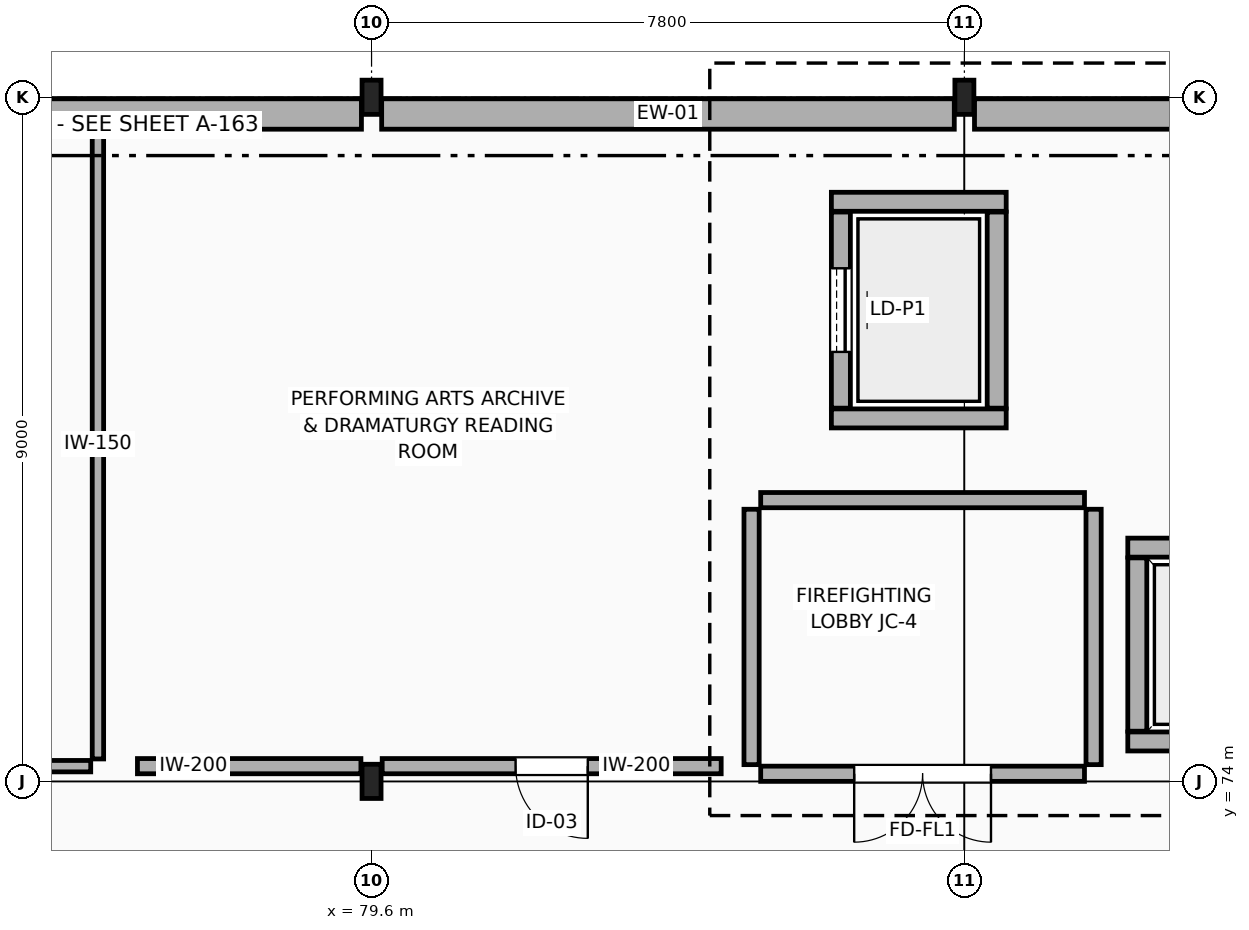
"""IFC4 building model, lengths in metres.
Left out: names, types, materials, properties, quantities, classifications, styles, units other than length and angle.
Written with IfcOpenShell. Run it as: python <this file> out.ifc"""

import sys

from ifc_helpers import new_model, si_unit, direction, frame, frame_2d, origin, origin_2d, place, context, subcontext, project, spatial, rectangle, i_section, extrude, element, fill, save


model = new_model("IFC4")
c1 = context("Model", 3, precision=1e-05, world=origin(), true_north=direction((0.0, 1.0)))
c2 = subcontext(c1, "Body", "Model", "MODEL_VIEW")
j1 = project(units=[si_unit("LENGTHUNIT", "METRE"), si_unit("PLANEANGLEUNIT", "RADIAN")], contexts=[c1])
p1 = place(None, origin())
s1 = spatial("IfcSite", under=j1, at=p1, CompositionType="ELEMENT")
p2 = place(p1, origin())
s2 = spatial("IfcBuilding", under=s1, at=p2, CompositionType="ELEMENT")
p3 = place(p2, frame((0.0, 0.0, 24.3)))
s3 = spatial("IfcBuildingStorey", under=s2, at=p3, CompositionType="ELEMENT", Elevation=24.3)
for number, where, z_axis, x_axis in (
    (1, (79.6, 74.0, 0.0), (0.0, 0.0, 1.0), (1.0, 0.0, 0.0)),
    (2, (79.6, 83.0, 0.0), (0.0, 0.0, 1.0), (1.0, 0.0, 0.0)),
    (3, (87.4, 83.0, 0.0), (0.0, 0.0, 1.0), (1.0, 0.0, 0.0)),
):
    element("IfcColumn", number, at=place(p3, frame(where, z_axis=z_axis, x_axis=x_axis)), inside=s3, PredefinedType="COLUMN", context=c2, shape_type="SweptSolid", body=[
        extrude(i_section(OverallWidth=0.25, OverallDepth=0.45, WebThickness=0.011, FlangeThickness=0.014, FilletRadius=0.015, at=origin_2d()), origin(), (0.0, 0.0, 1.0), 4.5),
    ])
p4 = place(p3, frame((71.933, 82.78, 0.0), z_axis=(0.0, 0.0, 1.0), x_axis=(1.0, 0.0, 0.0)))
e4 = element("IfcWall", 4, at=p4, inside=s3, PredefinedType="STANDARD", context=c2, shape_type="SweptSolid", body=[
    extrude(rectangle(XDim=7.534, YDim=0.4, at=frame_2d((3.767, 0.0))), origin(), (0.0, 0.0, 1.0), 4.5),
])
p5 = place(p3, frame((79.733, 82.78, 0.0), z_axis=(0.0, 0.0, 1.0), x_axis=(1.0, 0.0, 0.0)))
e5 = element("IfcWall", 5, at=p5, inside=s3, PredefinedType="STANDARD", context=c2, shape_type="SweptSolid", body=[
    extrude(rectangle(XDim=7.534, YDim=0.4, at=frame_2d((3.767, 0.0))), origin(), (0.0, 0.0, 1.0), 4.5),
])
p6 = place(p3, frame((87.533, 82.78, 0.0), z_axis=(0.0, 0.0, 1.0), x_axis=(1.0, 0.0, 0.0)))
e6 = element("IfcWall", 6, at=p6, inside=s3, PredefinedType="STANDARD", context=c2, shape_type="SweptSolid", body=[
    extrude(rectangle(XDim=5.863, YDim=0.4, at=frame_2d((2.932, 0.0))), origin(), (0.0, 0.0, 1.0), 4.28),
])
p7 = place(p3, frame((89.55, 74.525, 0.0), z_axis=(0.0, 0.0, 1.0), x_axis=(1.0, 0.0, 0.0)))
e7 = element("IfcWall", 7, at=p7, inside=s3, PredefinedType="STANDARD", context=c2, shape_type="SweptSolid", body=[
    extrude(rectangle(XDim=2.5, YDim=0.25, at=frame_2d((1.25, 0.0))), origin(), (0.0, 0.0, 1.0), 4.27),
])
p8 = place(p7, frame((0.65, 0.0, 0.0)))
e8 = element("IfcOpeningElement", 8, at=p8, cuts=e7, PredefinedType="OPENING", context=c2, shape_type="SweptSolid", body=[
    extrude(rectangle(XDim=1.2, YDim=2.05, at=frame_2d((0.6, 1.025))), frame((0.0, 0.135, 0.0), z_axis=(0.0, -1.0, 0.0), x_axis=(1.0, 0.0, 0.0)), (0.0, 0.0, 1.0), 0.27),
])
p9 = place(p3, frame((92.05, 77.075, 0.0), z_axis=(0.0, 0.0, 1.0), x_axis=(-1.0, 0.0, 0.0)))
e9 = element("IfcWall", 9, at=p9, inside=s3, PredefinedType="STANDARD", context=c2, shape_type="SweptSolid", body=[
    extrude(rectangle(XDim=2.5, YDim=0.25, at=frame_2d((1.25, 0.0))), origin(), (0.0, 0.0, 1.0), 4.27),
])
p10 = place(p3, frame((89.675, 76.94, 0.0), z_axis=(0.0, 0.0, 1.0), x_axis=(0.0, -1.0, 0.0)))
e10 = element("IfcWall", 10, at=p10, inside=s3, PredefinedType="STANDARD", context=c2, shape_type="SweptSolid", body=[
    extrude(rectangle(XDim=2.28, YDim=0.25, at=frame_2d((1.14, 0.0))), origin(), (0.0, 0.0, 1.0), 4.27),
])
for number, where, z_axis, x_axis in (
    (11, (85.65, 78.775, 0.0), (0.0, 0.0, 1.0), (1.0, 0.0, 0.0)),
    (12, (87.95, 81.625, 0.0), (0.0, 0.0, 1.0), (-1.0, 0.0, 0.0)),
):
    element("IfcWall", number, at=place(p3, frame(where, z_axis=z_axis, x_axis=x_axis)), inside=s3, PredefinedType="STANDARD", context=c2, shape_type="SweptSolid", body=[
        extrude(rectangle(XDim=2.3, YDim=0.25, at=frame_2d((1.15, 0.0))), origin(), (0.0, 0.0, 1.0), 4.5),
    ])
p11 = place(p3, frame((87.825, 78.91, 0.0), z_axis=(0.0, 0.0, 1.0), x_axis=(0.0, 1.0, 0.0)))
e13 = element("IfcWall", 13, at=p11, inside=s3, PredefinedType="STANDARD", context=c2, shape_type="SweptSolid", body=[
    extrude(rectangle(XDim=2.58, YDim=0.25, at=frame_2d((1.29, 0.0))), origin(), (0.0, 0.0, 1.0), 4.5),
])
p12 = place(p3, frame((85.775, 81.49, 0.0), z_axis=(0.0, 0.0, 1.0), x_axis=(0.0, -1.0, 0.0)))
e14 = element("IfcWall", 14, at=p12, inside=s3, PredefinedType="STANDARD", context=c2, shape_type="SweptSolid", body=[
    extrude(rectangle(XDim=2.58, YDim=0.25, at=frame_2d((1.29, 0.0))), origin(), (0.0, 0.0, 1.0), 4.5),
])
p13 = place(p12, frame((0.74, 0.0, 0.0)))
e15 = element("IfcOpeningElement", 15, at=p13, cuts=e14, PredefinedType="OPENING", context=c2, shape_type="SweptSolid", body=[
    extrude(rectangle(XDim=1.1, YDim=2.15, at=frame_2d((0.55, 1.075))), frame((0.0, 0.135, 0.0), z_axis=(0.0, -1.0, 0.0), x_axis=(1.0, 0.0, 0.0)), (0.0, 0.0, 1.0), 0.27),
])
p14 = place(p3, frame((84.6, 74.22, 0.0), z_axis=(0.0, 0.0, 1.0), x_axis=(0.0, 1.0, 0.0)))
e16 = element("IfcWall", 16, at=p14, inside=s3, PredefinedType="PARTITIONING", context=c2, shape_type="SweptSolid", body=[
    extrude(rectangle(XDim=3.36, YDim=0.2, at=frame_2d((1.68, 0.0))), origin(), (0.0, 0.0, 1.0), 4.5),
])
p15 = place(p3, frame((84.72, 77.7, 0.0), z_axis=(0.0, 0.0, 1.0), x_axis=(1.0, 0.0, 0.0)))
e17 = element("IfcWall", 17, at=p15, inside=s3, PredefinedType="PARTITIONING", context=c2, shape_type="SweptSolid", body=[
    extrude(rectangle(XDim=4.26, YDim=0.2, at=frame_2d((2.13, 0.0))), origin(), (0.0, 0.0, 1.0), 4.5),
])
p16 = place(p3, frame((89.1, 77.58, 0.0), z_axis=(0.0, 0.0, 1.0), x_axis=(0.0, -1.0, 0.0)))
e18 = element("IfcWall", 18, at=p16, inside=s3, PredefinedType="PARTITIONING", context=c2, shape_type="SweptSolid", body=[
    extrude(rectangle(XDim=3.36, YDim=0.2, at=frame_2d((1.68, 0.0))), origin(), (0.0, 0.0, 1.0), 4.5),
])
p17 = place(p3, frame((88.98, 74.1, 0.0), z_axis=(0.0, 0.0, 1.0), x_axis=(-1.0, 0.0, 0.0)))
e19 = element("IfcWall", 19, at=p17, inside=s3, PredefinedType="PARTITIONING", context=c2, shape_type="SweptSolid", body=[
    extrude(rectangle(XDim=4.26, YDim=0.2, at=frame_2d((2.13, 0.0))), origin(), (0.0, 0.0, 1.0), 4.5),
])
p18 = place(p17, frame((1.23, 0.0, 0.0)))
e20 = element("IfcOpeningElement", 20, at=p18, cuts=e19, PredefinedType="OPENING", context=c2, shape_type="SweptSolid", body=[
    extrude(rectangle(XDim=1.8, YDim=2.15, at=frame_2d((0.9, 1.075))), frame((0.0, 0.11, 0.0), z_axis=(0.0, -1.0, 0.0), x_axis=(1.0, 0.0, 0.0)), (0.0, 0.0, 1.0), 0.22),
])
p19 = place(p3, frame((76.0, 82.576, 0.0), z_axis=(0.0, 0.0, 1.0), x_axis=(0.0, -1.0, 0.0)))
e21 = element("IfcWall", 21, at=p19, inside=s3, PredefinedType="PARTITIONING", context=c2, shape_type="SweptSolid", body=[
    extrude(rectangle(XDim=8.281, YDim=0.15, at=frame_2d((4.141, 0.0))), origin(), (0.0, 0.0, 1.0), 4.5),
])
p20 = place(p3, frame((75.905, 74.2, 0.0), z_axis=(0.0, 0.0, 1.0), x_axis=(-1.0, 0.0, 0.0)))
e22 = element("IfcWall", 22, at=p20, inside=s3, PredefinedType="PARTITIONING", context=c2, shape_type="SweptSolid", body=[
    extrude(rectangle(XDim=3.965, YDim=0.15, at=frame_2d((1.982, 0.0))), origin(), (0.0, 0.0, 1.0), 4.5),
])
p21 = place(p3, frame((84.2, 74.2, 0.0), z_axis=(0.0, 0.0, 1.0), x_axis=(-1.0, 0.0, 0.0)))
e23 = element("IfcWall", 23, at=p21, inside=s3, PredefinedType="PARTITIONING", context=c2, shape_type="SweptSolid", body=[
    extrude(rectangle(XDim=4.46, YDim=0.2, at=frame_2d((2.23, 0.0))), origin(), (0.0, 0.0, 1.0), 4.5),
])
p22 = place(p21, frame((1.755, 0.0, 0.0)))
e24 = element("IfcOpeningElement", 24, at=p22, cuts=e23, PredefinedType="OPENING", context=c2, shape_type="SweptSolid", body=[
    extrude(rectangle(XDim=0.95, YDim=2.15, at=frame_2d((0.475, 1.075))), frame((0.0, 0.11, 0.0), z_axis=(0.0, -1.0, 0.0), x_axis=(1.0, 0.0, 0.0)), (0.0, 0.0, 1.0), 0.22),
])
p23 = place(p3, frame((79.46, 74.2, 0.0), z_axis=(0.0, 0.0, 1.0), x_axis=(-1.0, 0.0, 0.0)))
e25 = element("IfcWall", 25, at=p23, inside=s3, PredefinedType="PARTITIONING", context=c2, shape_type="SweptSolid", body=[
    extrude(rectangle(XDim=2.94, YDim=0.2, at=frame_2d((1.47, 0.0))), origin(), (0.0, 0.0, 1.0), 4.5),
])
p24 = place(p13, origin())
e26 = element("IfcDoor", 26, at=p24, inside=s3, OperationType="DOUBLE_DOOR_SLIDING", PredefinedType="DOOR", context=c2, shape_type="SweptSolid", body=[
    extrude(rectangle(XDim=1.1, YDim=2.15, at=frame_2d((0.55, 1.075))), frame((0.0, 0.025, 0.0), z_axis=(0.0, -1.0, 0.0), x_axis=(1.0, 0.0, 0.0)), (0.0, 0.0, 1.0), 0.05),
])
fill(e15, e26)
p25 = place(p18, origin())
e27 = element("IfcDoor", 27, at=p25, inside=s3, OperationType="DOUBLE_DOOR_SINGLE_SWING", PredefinedType="DOOR", context=c2, shape_type="SweptSolid", body=[
    extrude(rectangle(XDim=1.8, YDim=2.15, at=frame_2d((0.9, 1.075))), frame((0.0, 0.025, 0.0), z_axis=(0.0, -1.0, 0.0), x_axis=(1.0, 0.0, 0.0)), (0.0, 0.0, 1.0), 0.05),
])
fill(e20, e27)
p26 = place(p22, origin())
e28 = element("IfcDoor", 28, at=p26, inside=s3, OperationType="SINGLE_SWING_LEFT", PredefinedType="DOOR", context=c2, shape_type="SweptSolid", body=[
    extrude(rectangle(XDim=0.95, YDim=2.15, at=frame_2d((0.475, 1.075))), frame((0.0, 0.025, 0.0), z_axis=(0.0, -1.0, 0.0), x_axis=(1.0, 0.0, 0.0)), (0.0, 0.0, 1.0), 0.05),
])
fill(e24, e28)
save(model, sys.argv[1])
